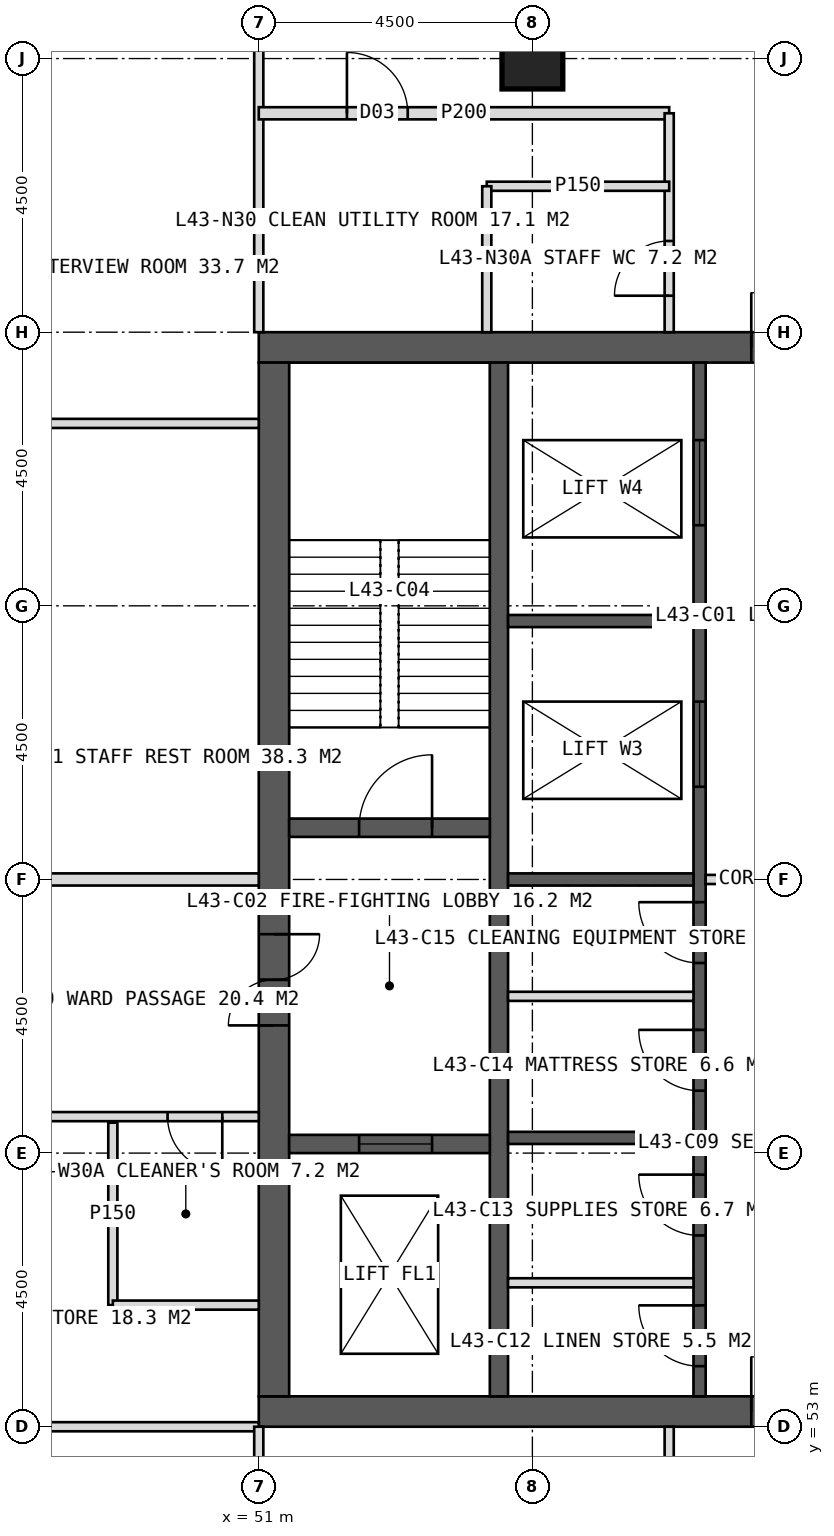
"""IFC4 building model, lengths in metres.
Left out: names, types, materials, properties, quantities, classifications, styles, units other than length and angle.
Written with IfcOpenShell. Run it as: python <this file> out.ifc"""

import sys

from ifc_helpers import new_model, si_unit, direction, frame, frame_2d, origin, origin_2d, place, context, subcontext, project, spatial, rectangle, hollow_rectangle, extrude, element, fill, save


model = new_model("IFC4")
c1 = context("Model", 3, precision=1e-05, world=origin(), true_north=direction((0.0, 1.0)))
c2 = subcontext(c1, "Body", "Model", "MODEL_VIEW")
j1 = project(units=[si_unit("LENGTHUNIT", "METRE"), si_unit("PLANEANGLEUNIT", "RADIAN")], contexts=[c1])
p1 = place(None, origin())
s1 = spatial("IfcSite", under=j1, at=p1, CompositionType="ELEMENT")
p2 = place(p1, origin())
s2 = spatial("IfcBuilding", under=s1, at=p2, CompositionType="ELEMENT")
p3 = place(p2, frame((0.0, 0.0, 181.0)))
s3 = spatial("IfcBuildingStorey", under=s2, at=p3, CompositionType="ELEMENT", Elevation=181.0)
p4 = place(p3, frame((51.0, 70.75, 0.0), z_axis=(0.0, 0.0, 1.0), x_axis=(1.0, 0.0, 0.0)))
e1 = element("IfcWall", 1, at=p4, inside=s3, PredefinedType="SHEAR", context=c2, shape_type="SweptSolid", body=[
    extrude(rectangle(XDim=18.0, YDim=0.5, at=frame_2d((9.0, 0.0))), origin(), (0.0, 0.0, 1.0), 4.0),
])
p5 = place(p4, frame((8.1, 0.0, 0.0)))
e2 = element("IfcOpeningElement", 2, at=p5, cuts=e1, PredefinedType="OPENING", context=c2, shape_type="SweptSolid", body=[
    extrude(rectangle(XDim=1.8, YDim=2.2, at=frame_2d((0.9, 1.1))), frame((0.0, 0.26, 0.0), z_axis=(0.0, -1.0, 0.0), x_axis=(1.0, 0.0, 0.0)), (0.0, 0.0, 1.0), 0.52),
])
p6 = place(p3, frame((51.0, 53.25, 0.0), z_axis=(0.0, 0.0, 1.0), x_axis=(1.0, 0.0, 0.0)))
e3 = element("IfcWall", 3, at=p6, inside=s3, PredefinedType="SHEAR", context=c2, shape_type="SweptSolid", body=[
    extrude(rectangle(XDim=18.0, YDim=0.5, at=frame_2d((9.0, 0.0))), origin(), (0.0, 0.0, 1.0), 4.0),
])
p7 = place(p6, frame((8.1, 0.0, 0.0)))
e4 = element("IfcOpeningElement", 4, at=p7, cuts=e3, PredefinedType="OPENING", context=c2, shape_type="SweptSolid", body=[
    extrude(rectangle(XDim=1.8, YDim=2.2, at=frame_2d((0.9, 1.1))), frame((0.0, 0.26, 0.0), z_axis=(0.0, -1.0, 0.0), x_axis=(1.0, 0.0, 0.0)), (0.0, 0.0, 1.0), 0.52),
])
p8 = place(p3, frame((51.25, 53.5, 0.0), z_axis=(0.0, 0.0, 1.0), x_axis=(0.0, 1.0, 0.0)))
e5 = element("IfcWall", 5, at=p8, inside=s3, PredefinedType="SHEAR", context=c2, shape_type="SweptSolid", body=[
    extrude(rectangle(XDim=17.0, YDim=0.5, at=frame_2d((8.5, 0.0))), origin(), (0.0, 0.0, 1.0), 4.0),
])
p9 = place(p8, frame((6.1, 0.0, 0.0)))
e6 = element("IfcOpeningElement", 6, at=p9, cuts=e5, PredefinedType="OPENING", context=c2, shape_type="SweptSolid", body=[
    extrude(rectangle(XDim=1.5, YDim=2.2, at=frame_2d((0.75, 1.1))), frame((0.0, 0.26, 0.0), z_axis=(0.0, -1.0, 0.0), x_axis=(1.0, 0.0, 0.0)), (0.0, 0.0, 1.0), 0.52),
])
p10 = place(p3, frame((54.95, 53.5, 0.0), z_axis=(0.0, 0.0, 1.0), x_axis=(0.0, 1.0, 0.0)))
e7 = element("IfcWall", 7, at=p10, inside=s3, PredefinedType="SHEAR", context=c2, shape_type="SweptSolid", body=[
    extrude(rectangle(XDim=17.0, YDim=0.3, at=frame_2d((8.5, 0.0))), origin(), (0.0, 0.0, 1.0), 4.0),
])
p11 = place(p3, frame((58.25, 53.5, 0.0), z_axis=(0.0, 0.0, 1.0), x_axis=(0.0, 1.0, 0.0)))
e8 = element("IfcWall", 8, at=p11, inside=s3, PredefinedType="SHEAR", context=c2, shape_type="SweptSolid", body=[
    extrude(rectangle(XDim=17.0, YDim=0.2, at=frame_2d((8.5, 0.0))), origin(), (0.0, 0.0, 1.0), 4.0),
])
p12 = place(p11, frame((0.496, 0.0, 0.0)))
e9 = element("IfcOpeningElement", 9, at=p12, cuts=e8, PredefinedType="OPENING", context=c2, shape_type="SweptSolid", body=[
    extrude(rectangle(XDim=1.0, YDim=2.1, at=frame_2d((0.5, 1.05))), frame((0.0, 0.11, 0.0), z_axis=(0.0, -1.0, 0.0), x_axis=(1.0, 0.0, 0.0)), (0.0, 0.0, 1.0), 0.22),
])
p13 = place(p11, frame((2.646, 0.0, 0.0)))
e10 = element("IfcOpeningElement", 10, at=p13, cuts=e8, PredefinedType="OPENING", context=c2, shape_type="SweptSolid", body=[
    extrude(rectangle(XDim=1.0, YDim=2.1, at=frame_2d((0.5, 1.05))), frame((0.0, 0.11, 0.0), z_axis=(0.0, -1.0, 0.0), x_axis=(1.0, 0.0, 0.0)), (0.0, 0.0, 1.0), 0.22),
])
p14 = place(p11, frame((5.027, 0.0, 0.0)))
e11 = element("IfcOpeningElement", 11, at=p14, cuts=e8, PredefinedType="OPENING", context=c2, shape_type="SweptSolid", body=[
    extrude(rectangle(XDim=1.0, YDim=2.1, at=frame_2d((0.5, 1.05))), frame((0.0, 0.11, 0.0), z_axis=(0.0, -1.0, 0.0), x_axis=(1.0, 0.0, 0.0)), (0.0, 0.0, 1.0), 0.22),
])
p15 = place(p11, frame((7.126, 0.0, 0.0)))
e12 = element("IfcOpeningElement", 12, at=p15, cuts=e8, PredefinedType="OPENING", context=c2, shape_type="SweptSolid", body=[
    extrude(rectangle(XDim=1.0, YDim=2.1, at=frame_2d((0.5, 1.05))), frame((0.0, 0.11, 0.0), z_axis=(0.0, -1.0, 0.0), x_axis=(1.0, 0.0, 0.0)), (0.0, 0.0, 1.0), 0.22),
])
p16 = place(p11, frame((10.025, 0.0, 0.0)))
e13 = element("IfcOpeningElement", 13, at=p16, cuts=e8, PredefinedType="OPENING", context=c2, shape_type="SweptSolid", body=[
    extrude(rectangle(XDim=1.4, YDim=2.2, at=frame_2d((0.7, 1.1))), frame((0.0, 0.11, 0.0), z_axis=(0.0, -1.0, 0.0), x_axis=(1.0, 0.0, 0.0)), (0.0, 0.0, 1.0), 0.22),
])
p17 = place(p11, frame((14.325, 0.0, 0.0)))
e14 = element("IfcOpeningElement", 14, at=p17, cuts=e8, PredefinedType="OPENING", context=c2, shape_type="SweptSolid", body=[
    extrude(rectangle(XDim=1.4, YDim=2.2, at=frame_2d((0.7, 1.1))), frame((0.0, 0.11, 0.0), z_axis=(0.0, -1.0, 0.0), x_axis=(1.0, 0.0, 0.0)), (0.0, 0.0, 1.0), 0.22),
])
for number, where, z_axis, x_axis in (
    (15, (55.1, 57.75, 0.0), (0.0, 0.0, 1.0), (1.0, 0.0, 0.0)),
    (16, (55.1, 62.0, 0.0), (0.0, 0.0, 1.0), (1.0, 0.0, 0.0)),
    (17, (55.1, 66.25, 0.0), (0.0, 0.0, 1.0), (1.0, 0.0, 0.0)),
):
    element("IfcWall", number, at=place(p3, frame(where, z_axis=z_axis, x_axis=x_axis)), inside=s3, PredefinedType="SHEAR", context=c2, shape_type="SweptSolid", body=[
        extrude(rectangle(XDim=3.05, YDim=0.2, at=frame_2d((1.525, 0.0))), origin(), (0.0, 0.0, 1.0), 4.0),
    ])
p18 = place(p3, frame((51.5, 62.85, 0.0), z_axis=(0.0, 0.0, 1.0), x_axis=(1.0, 0.0, 0.0)))
e18 = element("IfcWall", 18, at=p18, inside=s3, PredefinedType="SHEAR", context=c2, shape_type="SweptSolid", body=[
    extrude(rectangle(XDim=3.3, YDim=0.3, at=frame_2d((1.65, 0.0))), origin(), (0.0, 0.0, 1.0), 4.0),
])
p19 = place(p18, frame((1.15, 0.0, 0.0)))
e19 = element("IfcOpeningElement", 19, at=p19, cuts=e18, PredefinedType="OPENING", context=c2, shape_type="SweptSolid", body=[
    extrude(rectangle(XDim=1.2, YDim=2.1, at=frame_2d((0.6, 1.05))), frame((0.0, 0.16, 0.0), z_axis=(0.0, -1.0, 0.0), x_axis=(1.0, 0.0, 0.0)), (0.0, 0.0, 1.0), 0.32),
])
p20 = place(p3, frame((51.5, 57.65, 0.0), z_axis=(0.0, 0.0, 1.0), x_axis=(1.0, 0.0, 0.0)))
e20 = element("IfcWall", 20, at=p20, inside=s3, PredefinedType="SHEAR", context=c2, shape_type="SweptSolid", body=[
    extrude(rectangle(XDim=3.3, YDim=0.3, at=frame_2d((1.65, 0.0))), origin(), (0.0, 0.0, 1.0), 4.0),
])
p21 = place(p20, frame((1.15, 0.0, 0.0)))
e21 = element("IfcOpeningElement", 21, at=p21, cuts=e20, PredefinedType="OPENING", context=c2, shape_type="SweptSolid", body=[
    extrude(rectangle(XDim=1.2, YDim=2.2, at=frame_2d((0.6, 1.1))), frame((0.0, 0.16, 0.0), z_axis=(0.0, -1.0, 0.0), x_axis=(1.0, 0.0, 0.0)), (0.0, 0.0, 1.0), 0.32),
])
p22 = place(p3, frame((55.5, 75.5, 0.0), z_axis=(0.0, 0.0, 1.0), x_axis=(1.0, 0.0, 0.0)))
e22 = element("IfcColumn", 22, at=p22, inside=s3, PredefinedType="COLUMN", context=c2, shape_type="SweptSolid", body=[
    extrude(hollow_rectangle(XDim=1.0, YDim=1.0, WallThickness=0.1, at=origin_2d()), origin(), (0.0, 0.0, 1.0), 4.0),
])
p23 = place(p3, frame((51.0, 71.0, 0.0), z_axis=(0.0, 0.0, 1.0), x_axis=(0.0, 1.0, 0.0)))
e23 = element("IfcWall", 23, at=p23, inside=s3, PredefinedType="PARTITIONING", context=c2, shape_type="SweptSolid", body=[
    extrude(rectangle(XDim=5.1, YDim=0.15, at=frame_2d((2.55, 0.0))), origin(), (0.0, 0.0, 1.0), 3.75),
])
p24 = place(p3, frame((51.0, 74.6, 0.0), z_axis=(0.0, 0.0, 1.0), x_axis=(1.0, 0.0, 0.0)))
e24 = element("IfcWall", 24, at=p24, inside=s3, PredefinedType="PARTITIONING", context=c2, shape_type="SweptSolid", body=[
    extrude(rectangle(XDim=6.75, YDim=0.2, at=frame_2d((3.375, 0.0))), origin(), (0.0, 0.0, 1.0), 3.75),
])
p25 = place(p24, frame((1.45, 0.0, 0.0)))
e25 = element("IfcOpeningElement", 25, at=p25, cuts=e24, PredefinedType="OPENING", context=c2, shape_type="SweptSolid", body=[
    extrude(rectangle(XDim=1.0, YDim=2.1, at=frame_2d((0.5, 1.05))), frame((0.0, 0.11, 0.0), z_axis=(0.0, -1.0, 0.0), x_axis=(1.0, 0.0, 0.0)), (0.0, 0.0, 1.0), 0.22),
])
p26 = place(p3, frame((57.75, 71.0, 0.0), z_axis=(0.0, 0.0, 1.0), x_axis=(0.0, 1.0, 0.0)))
e26 = element("IfcWall", 26, at=p26, inside=s3, PredefinedType="PARTITIONING", context=c2, shape_type="SweptSolid", body=[
    extrude(rectangle(XDim=3.6, YDim=0.15, at=frame_2d((1.8, 0.0))), origin(), (0.0, 0.0, 1.0), 3.75),
])
p27 = place(p26, frame((0.6, 0.0, 0.0)))
e27 = element("IfcOpeningElement", 27, at=p27, cuts=e26, PredefinedType="OPENING", context=c2, shape_type="SweptSolid", body=[
    extrude(rectangle(XDim=0.9, YDim=2.1, at=frame_2d((0.45, 1.05))), frame((0.0, 0.085, 0.0), z_axis=(0.0, -1.0, 0.0), x_axis=(1.0, 0.0, 0.0)), (0.0, 0.0, 1.0), 0.17),
])
p28 = place(p3, frame((54.75, 73.4, 0.0), z_axis=(0.0, 0.0, 1.0), x_axis=(1.0, 0.0, 0.0)))
e28 = element("IfcWall", 28, at=p28, inside=s3, PredefinedType="PARTITIONING", context=c2, shape_type="SweptSolid", body=[
    extrude(rectangle(XDim=3.0, YDim=0.15, at=frame_2d((1.5, 0.0))), origin(), (0.0, 0.0, 1.0), 3.75),
])
p29 = place(p3, frame((54.75, 71.0, 0.0), z_axis=(0.0, 0.0, 1.0), x_axis=(0.0, 1.0, 0.0)))
e29 = element("IfcWall", 29, at=p29, inside=s3, PredefinedType="PARTITIONING", context=c2, shape_type="SweptSolid", body=[
    extrude(rectangle(XDim=2.4, YDim=0.15, at=frame_2d((1.2, 0.0))), origin(), (0.0, 0.0, 1.0), 3.75),
])
p30 = place(p3, frame((51.0, 53.0, 0.0), z_axis=(0.0, 0.0, 1.0), x_axis=(-1.0, 0.0, 0.0)))
e30 = element("IfcWall", 30, at=p30, inside=s3, PredefinedType="PARTITIONING", context=c2, shape_type="SweptSolid", body=[
    extrude(rectangle(XDim=5.1, YDim=0.15, at=frame_2d((2.55, 0.0))), origin(), (0.0, 0.0, 1.0), 3.75),
])
p31 = place(p3, frame((51.0, 58.1, 0.0), z_axis=(0.0, 0.0, 1.0), x_axis=(-1.0, 0.0, 0.0)))
e31 = element("IfcWall", 31, at=p31, inside=s3, PredefinedType="PARTITIONING", context=c2, shape_type="SweptSolid", body=[
    extrude(rectangle(XDim=5.1, YDim=0.15, at=frame_2d((2.55, 0.0))), origin(), (0.0, 0.0, 1.0), 3.75),
])
p32 = place(p31, frame((0.6, 0.0, 0.0)))
e32 = element("IfcOpeningElement", 32, at=p32, cuts=e31, PredefinedType="OPENING", context=c2, shape_type="SweptSolid", body=[
    extrude(rectangle(XDim=0.9, YDim=2.1, at=frame_2d((0.45, 1.05))), frame((0.0, 0.085, 0.0), z_axis=(0.0, -1.0, 0.0), x_axis=(1.0, 0.0, 0.0)), (0.0, 0.0, 1.0), 0.17),
])
p33 = place(p3, frame((51.0, 62.0, 0.0), z_axis=(0.0, 0.0, 1.0), x_axis=(-1.0, 0.0, 0.0)))
e33 = element("IfcWall", 33, at=p33, inside=s3, PredefinedType="SOLIDWALL", context=c2, shape_type="SweptSolid", body=[
    extrude(rectangle(XDim=5.1, YDim=0.2, at=frame_2d((2.55, 0.0))), origin(), (0.0, 0.0, 1.0), 2.95),
])
p34 = place(p3, frame((51.0, 69.5, 0.0), z_axis=(0.0, 0.0, 1.0), x_axis=(-1.0, 0.0, 0.0)))
e34 = element("IfcWall", 34, at=p34, inside=s3, PredefinedType="PARTITIONING", context=c2, shape_type="SweptSolid", body=[
    extrude(rectangle(XDim=5.1, YDim=0.15, at=frame_2d((2.55, 0.0))), origin(), (0.0, 0.0, 1.0), 3.75),
])
p35 = place(p3, frame((48.6, 55.0, 0.0), z_axis=(0.0, 0.0, 1.0), x_axis=(0.0, 1.0, 0.0)))
e35 = element("IfcWall", 35, at=p35, inside=s3, PredefinedType="PARTITIONING", context=c2, shape_type="SweptSolid", body=[
    extrude(rectangle(XDim=3.0, YDim=0.15, at=frame_2d((1.5, 0.0))), origin(), (0.0, 0.0, 1.0), 3.75),
])
p36 = place(p3, frame((51.0, 55.0, 0.0), z_axis=(0.0, 0.0, 1.0), x_axis=(-1.0, 0.0, 0.0)))
e36 = element("IfcWall", 36, at=p36, inside=s3, PredefinedType="PARTITIONING", context=c2, shape_type="SweptSolid", body=[
    extrude(rectangle(XDim=2.4, YDim=0.15, at=frame_2d((1.2, 0.0))), origin(), (0.0, 0.0, 1.0), 3.75),
])
for number, where, z_axis, x_axis in (
    (37, (57.75, 53.0, 0.0), (0.0, 0.0, 1.0), (0.0, -1.0, 0.0)),
    (38, (51.0, 53.0, 0.0), (0.0, 0.0, 1.0), (0.0, -1.0, 0.0)),
):
    element("IfcWall", number, at=place(p3, frame(where, z_axis=z_axis, x_axis=x_axis)), inside=s3, PredefinedType="PARTITIONING", context=c2, shape_type="SweptSolid", body=[
        extrude(rectangle(XDim=3.6, YDim=0.15, at=frame_2d((1.8, 0.0))), origin(), (0.0, 0.0, 1.0), 3.75),
    ])
for number, where, z_axis, x_axis in (
    (39, (55.1, 55.367, 0.0), (0.0, 0.0, 1.0), (1.0, 0.0, 0.0)),
    (40, (55.1, 60.078, 0.0), (0.0, 0.0, 1.0), (1.0, 0.0, 0.0)),
):
    element("IfcWall", number, at=place(p3, frame(where, z_axis=z_axis, x_axis=x_axis)), inside=s3, PredefinedType="PARTITIONING", context=c2, shape_type="SweptSolid", body=[
        extrude(rectangle(XDim=3.05, YDim=0.15, at=frame_2d((1.525, 0.0))), origin(), (0.0, 0.0, 1.0), 3.75),
    ])
p37 = place(p3, frame((58.35, 62.0, 0.0), z_axis=(0.0, 0.0, 1.0), x_axis=(1.0, 0.0, 0.0)))
e41 = element("IfcWall", 41, at=p37, inside=s3, PredefinedType="PARTITIONING", context=c2, shape_type="SweptSolid", body=[
    extrude(rectangle(XDim=3.3, YDim=0.15, at=frame_2d((1.65, 0.0))), origin(), (0.0, 0.0, 1.0), 3.75),
])
p38 = place(p27, origin())
e42 = element("IfcDoor", 42, at=p38, inside=s3, OperationType="SINGLE_SWING_LEFT", PredefinedType="DOOR", context=c2, shape_type="SweptSolid", body=[
    extrude(rectangle(XDim=0.9, YDim=2.1, at=frame_2d((0.45, 1.05))), frame((0.0, 0.025, 0.0), z_axis=(0.0, -1.0, 0.0), x_axis=(1.0, 0.0, 0.0)), (0.0, 0.0, 1.0), 0.05),
])
fill(e27, e42)
p39 = place(p25, origin())
e43 = element("IfcDoor", 43, at=p39, inside=s3, OperationType="SINGLE_SWING_LEFT", PredefinedType="DOOR", context=c2, shape_type="SweptSolid", body=[
    extrude(rectangle(XDim=1.0, YDim=2.1, at=frame_2d((0.5, 1.05))), frame((0.0, 0.025, 0.0), z_axis=(0.0, -1.0, 0.0), x_axis=(1.0, 0.0, 0.0)), (0.0, 0.0, 1.0), 0.05),
])
fill(e25, e43)
p40 = place(p32, origin())
e44 = element("IfcDoor", 44, at=p40, inside=s3, OperationType="SINGLE_SWING_LEFT", PredefinedType="DOOR", context=c2, shape_type="SweptSolid", body=[
    extrude(rectangle(XDim=0.9, YDim=2.1, at=frame_2d((0.45, 1.05))), frame((0.0, 0.025, 0.0), z_axis=(0.0, -1.0, 0.0), x_axis=(1.0, 0.0, 0.0)), (0.0, 0.0, 1.0), 0.05),
])
fill(e32, e44)
p41 = place(p5, origin())
e45 = element("IfcDoor", 45, at=p41, inside=s3, OperationType="DOUBLE_DOOR_SINGLE_SWING", PredefinedType="DOOR", context=c2, shape_type="SweptSolid", body=[
    extrude(rectangle(XDim=1.8, YDim=2.2, at=frame_2d((0.9, 1.1))), frame((0.0, 0.025, 0.0), z_axis=(0.0, -1.0, 0.0), x_axis=(1.0, 0.0, 0.0)), (0.0, 0.0, 1.0), 0.05),
])
fill(e2, e45)
p42 = place(p9, origin())
e46 = element("IfcDoor", 46, at=p42, inside=s3, OperationType="DOUBLE_DOOR_SINGLE_SWING", PredefinedType="DOOR", context=c2, shape_type="SweptSolid", body=[
    extrude(rectangle(XDim=1.5, YDim=2.2, at=frame_2d((0.75, 1.1))), frame((0.0, 0.025, 0.0), z_axis=(0.0, -1.0, 0.0), x_axis=(1.0, 0.0, 0.0)), (0.0, 0.0, 1.0), 0.05),
])
fill(e6, e46)
p43 = place(p19, origin())
e47 = element("IfcDoor", 47, at=p43, inside=s3, OperationType="SINGLE_SWING_RIGHT", PredefinedType="DOOR", context=c2, shape_type="SweptSolid", body=[
    extrude(rectangle(XDim=1.2, YDim=2.1, at=frame_2d((0.6, 1.05))), frame((0.0, 0.025, 0.0), z_axis=(0.0, -1.0, 0.0), x_axis=(1.0, 0.0, 0.0)), (0.0, 0.0, 1.0), 0.05),
])
fill(e19, e47)
p44 = place(p21, origin())
e48 = element("IfcDoor", 48, at=p44, inside=s3, OperationType="SLIDING_TO_LEFT", PredefinedType="DOOR", context=c2, shape_type="SweptSolid", body=[
    extrude(rectangle(XDim=1.2, YDim=2.2, at=frame_2d((0.6, 1.1))), frame((0.0, 0.025, 0.0), z_axis=(0.0, -1.0, 0.0), x_axis=(1.0, 0.0, 0.0)), (0.0, 0.0, 1.0), 0.05),
])
fill(e21, e48)
p45 = place(p12, origin())
e49 = element("IfcDoor", 49, at=p45, inside=s3, OperationType="SINGLE_SWING_RIGHT", PredefinedType="DOOR", context=c2, shape_type="SweptSolid", body=[
    extrude(rectangle(XDim=1.0, YDim=2.1, at=frame_2d((0.5, 1.05))), frame((0.0, 0.025, 0.0), z_axis=(0.0, -1.0, 0.0), x_axis=(1.0, 0.0, 0.0)), (0.0, 0.0, 1.0), 0.05),
])
fill(e9, e49)
p46 = place(p13, origin())
e50 = element("IfcDoor", 50, at=p46, inside=s3, OperationType="SINGLE_SWING_RIGHT", PredefinedType="DOOR", context=c2, shape_type="SweptSolid", body=[
    extrude(rectangle(XDim=1.0, YDim=2.1, at=frame_2d((0.5, 1.05))), frame((0.0, 0.025, 0.0), z_axis=(0.0, -1.0, 0.0), x_axis=(1.0, 0.0, 0.0)), (0.0, 0.0, 1.0), 0.05),
])
fill(e10, e50)
p47 = place(p14, origin())
e51 = element("IfcDoor", 51, at=p47, inside=s3, OperationType="SINGLE_SWING_RIGHT", PredefinedType="DOOR", context=c2, shape_type="SweptSolid", body=[
    extrude(rectangle(XDim=1.0, YDim=2.1, at=frame_2d((0.5, 1.05))), frame((0.0, 0.025, 0.0), z_axis=(0.0, -1.0, 0.0), x_axis=(1.0, 0.0, 0.0)), (0.0, 0.0, 1.0), 0.05),
])
fill(e11, e51)
p48 = place(p15, origin())
e52 = element("IfcDoor", 52, at=p48, inside=s3, OperationType="SINGLE_SWING_RIGHT", PredefinedType="DOOR", context=c2, shape_type="SweptSolid", body=[
    extrude(rectangle(XDim=1.0, YDim=2.1, at=frame_2d((0.5, 1.05))), frame((0.0, 0.025, 0.0), z_axis=(0.0, -1.0, 0.0), x_axis=(1.0, 0.0, 0.0)), (0.0, 0.0, 1.0), 0.05),
])
fill(e12, e52)
p49 = place(p16, origin())
e53 = element("IfcDoor", 53, at=p49, inside=s3, OperationType="SLIDING_TO_LEFT", PredefinedType="DOOR", context=c2, shape_type="SweptSolid", body=[
    extrude(rectangle(XDim=1.4, YDim=2.2, at=frame_2d((0.7, 1.1))), frame((0.0, 0.025, 0.0), z_axis=(0.0, -1.0, 0.0), x_axis=(1.0, 0.0, 0.0)), (0.0, 0.0, 1.0), 0.05),
])
fill(e13, e53)
p50 = place(p17, origin())
e54 = element("IfcDoor", 54, at=p50, inside=s3, OperationType="SLIDING_TO_LEFT", PredefinedType="DOOR", context=c2, shape_type="SweptSolid", body=[
    extrude(rectangle(XDim=1.4, YDim=2.2, at=frame_2d((0.7, 1.1))), frame((0.0, 0.025, 0.0), z_axis=(0.0, -1.0, 0.0), x_axis=(1.0, 0.0, 0.0)), (0.0, 0.0, 1.0), 0.05),
])
fill(e14, e54)
p51 = place(p7, origin())
e55 = element("IfcDoor", 55, at=p51, inside=s3, OperationType="DOUBLE_DOOR_SINGLE_SWING", PredefinedType="DOOR", context=c2, shape_type="SweptSolid", body=[
    extrude(rectangle(XDim=1.8, YDim=2.2, at=frame_2d((0.9, 1.1))), frame((0.0, 0.025, 0.0), z_axis=(0.0, -1.0, 0.0), x_axis=(1.0, 0.0, 0.0)), (0.0, 0.0, 1.0), 0.05),
])
fill(e4, e55)
save(model, sys.argv[1])
